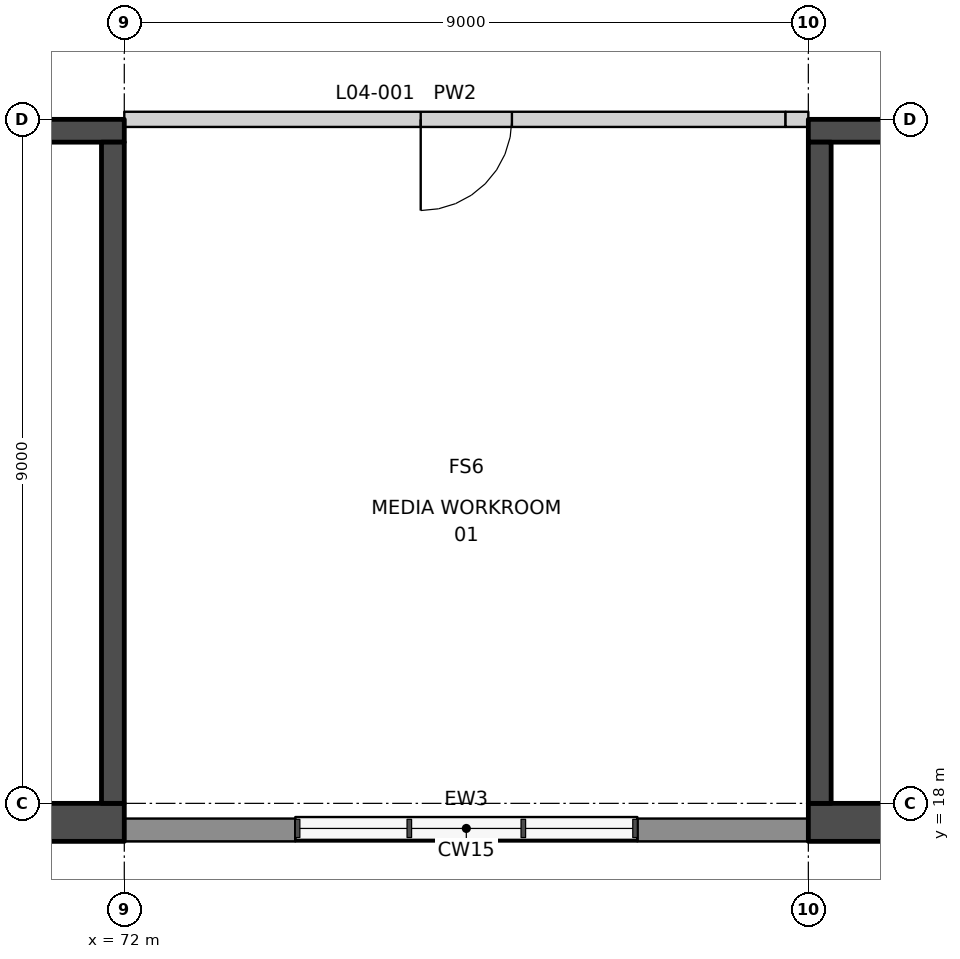
"""IFC4 building model, lengths in metres.
Left out: names, types, materials, properties, quantities, classifications, styles, units other than length and angle.
Written with IfcOpenShell. Run it as: python <this file> out.ifc"""

import sys

from ifc_helpers import new_model, si_unit, direction, frame, frame_2d, origin, place, context, subcontext, project, spatial, rectangle, extrude, element, fill, save


model = new_model("IFC4")
c1 = context("Model", 3, precision=1e-05, world=origin(), true_north=direction((0.0, 1.0)))
c2 = subcontext(c1, "Body", "Model", "MODEL_VIEW")
j1 = project(units=[si_unit("LENGTHUNIT", "METRE"), si_unit("PLANEANGLEUNIT", "RADIAN")], contexts=[c1])
p1 = place(None, origin())
s1 = spatial("IfcSite", under=j1, at=p1, CompositionType="ELEMENT")
p2 = place(p1, origin())
s2 = spatial("IfcBuilding", under=s1, at=p2, CompositionType="ELEMENT")
p3 = place(p2, frame((0.0, 0.0, 28.0)))
s3 = spatial("IfcBuildingStorey", under=s2, at=p3, CompositionType="ELEMENT", Elevation=28.0)
p4 = place(p3, frame((72.0, 27.0, 0.0), z_axis=(0.0, 0.0, 1.0), x_axis=(1.0, 0.0, 0.0)))
e1 = element("IfcWall", 1, at=p4, inside=s3, PredefinedType="PARTITIONING", context=c2, shape_type="SweptSolid", body=[
    extrude(rectangle(XDim=8.7, YDim=0.2, at=frame_2d((4.35, 0.0))), origin(), (0.0, 0.0, 1.0), 4.2),
])
p5 = place(p4, frame((3.9, 0.0, 0.0)))
e2 = element("IfcOpeningElement", 2, at=p5, cuts=e1, PredefinedType="OPENING", context=c2, shape_type="SweptSolid", body=[
    extrude(rectangle(XDim=1.2, YDim=2.1, at=frame_2d((0.6, 1.05))), frame((0.0, 0.11, 0.0), z_axis=(0.0, -1.0, 0.0), x_axis=(1.0, 0.0, 0.0)), (0.0, 0.0, 1.0), 0.22),
])
for number, where, z_axis, x_axis in (
    (3, (72.0, 17.65, 0.0), (0.0, 0.0, 1.0), (1.0, 0.0, 0.0)),
    (4, (78.75, 17.65, 0.0), (0.0, 0.0, 1.0), (1.0, 0.0, 0.0)),
):
    element("IfcWall", number, at=place(p3, frame(where, z_axis=z_axis, x_axis=x_axis)), inside=s3, PredefinedType="SOLIDWALL", context=c2, shape_type="SweptSolid", body=[
        extrude(rectangle(XDim=2.25, YDim=0.3, at=frame_2d((1.125, 0.0))), origin(), (0.0, 0.0, 1.0), 4.9),
    ])
p6 = place(p3, frame((74.25, 17.65, 0.0), z_axis=(0.0, 0.0, 1.0), x_axis=(1.0, 0.0, 0.0)))
e5 = element("IfcWall", 5, at=p6, inside=s3, PredefinedType="SOLIDWALL", context=c2, shape_type="SweptSolid", body=[
    extrude(rectangle(XDim=4.5, YDim=0.3, at=frame_2d((2.25, 0.0))), origin(), (0.0, 0.0, 1.0), 1.0),
])
p7 = place(p3, frame((81.0, 26.85, 0.0), z_axis=(0.0, 0.0, 1.0), x_axis=(1.0, 0.0, 0.0)))
e6 = element("IfcWall", 6, at=p7, inside=s3, PredefinedType="SHEAR", context=c2, shape_type="SweptSolid", body=[
    extrude(rectangle(XDim=18.0, YDim=0.3, at=frame_2d((9.0, 0.0))), origin(), (0.0, 0.0, 1.0), 5.5),
])
p8 = place(p7, frame((8.6, 0.0, 0.0)))
e7 = element("IfcOpeningElement", 7, at=p8, cuts=e6, PredefinedType="OPENING", context=c2, shape_type="SweptSolid", body=[
    extrude(rectangle(XDim=1.2, YDim=2.1, at=frame_2d((0.6, 1.05))), frame((0.0, 0.16, 0.0), z_axis=(0.0, -1.0, 0.0), x_axis=(1.0, 0.0, 0.0)), (0.0, 0.0, 1.0), 0.32),
])
p9 = place(p3, frame((81.0, 17.75, 0.0), z_axis=(0.0, 0.0, 1.0), x_axis=(1.0, 0.0, 0.0)))
e8 = element("IfcWall", 8, at=p9, inside=s3, PredefinedType="SHEAR", context=c2, shape_type="SweptSolid", body=[
    extrude(rectangle(XDim=18.0, YDim=0.5, at=frame_2d((9.0, 0.0))), origin(), (0.0, 0.0, 1.0), 5.5),
])
p10 = place(p3, frame((81.15, 26.7, 0.0), z_axis=(0.0, 0.0, 1.0), x_axis=(0.0, -1.0, 0.0)))
e9 = element("IfcWall", 9, at=p10, inside=s3, PredefinedType="SHEAR", context=c2, shape_type="SweptSolid", body=[
    extrude(rectangle(XDim=8.7, YDim=0.3, at=frame_2d((4.35, 0.0))), origin(), (0.0, 0.0, 1.0), 5.5),
])
p11 = place(p3, frame((72.0, 26.85, 0.0), z_axis=(0.0, 0.0, 1.0), x_axis=(-1.0, 0.0, 0.0)))
e10 = element("IfcWall", 10, at=p11, inside=s3, PredefinedType="SHEAR", context=c2, shape_type="SweptSolid", body=[
    extrude(rectangle(XDim=18.0, YDim=0.3, at=frame_2d((9.0, 0.0))), origin(), (0.0, 0.0, 1.0), 5.5),
])
p12 = place(p11, frame((8.6, 0.0, 0.0)))
e11 = element("IfcOpeningElement", 11, at=p12, cuts=e10, PredefinedType="OPENING", context=c2, shape_type="SweptSolid", body=[
    extrude(rectangle(XDim=1.2, YDim=2.1, at=frame_2d((0.6, 1.05))), frame((0.0, 0.16, 0.0), z_axis=(0.0, -1.0, 0.0), x_axis=(1.0, 0.0, 0.0)), (0.0, 0.0, 1.0), 0.32),
])
p13 = place(p3, frame((72.0, 17.75, 0.0), z_axis=(0.0, 0.0, 1.0), x_axis=(-1.0, 0.0, 0.0)))
e12 = element("IfcWall", 12, at=p13, inside=s3, PredefinedType="SHEAR", context=c2, shape_type="SweptSolid", body=[
    extrude(rectangle(XDim=18.0, YDim=0.5, at=frame_2d((9.0, 0.0))), origin(), (0.0, 0.0, 1.0), 5.5),
])
p14 = place(p3, frame((71.85, 26.7, 0.0), z_axis=(0.0, 0.0, 1.0), x_axis=(0.0, -1.0, 0.0)))
e13 = element("IfcWall", 13, at=p14, inside=s3, PredefinedType="SHEAR", context=c2, shape_type="SweptSolid", body=[
    extrude(rectangle(XDim=8.7, YDim=0.3, at=frame_2d((4.35, 0.0))), origin(), (0.0, 0.0, 1.0), 5.5),
])
p15 = place(p3, frame((80.7, 27.0, 0.0), z_axis=(0.0, 0.0, 1.0), x_axis=(1.0, 0.0, 0.0)))
e14 = element("IfcWall", 14, at=p15, inside=s3, PredefinedType="PARTITIONING", context=c2, shape_type="SweptSolid", body=[
    extrude(rectangle(XDim=0.3, YDim=0.2, at=frame_2d((0.15, 0.0))), origin(), (0.0, 0.0, 1.0), 5.5),
])
p16 = place(p5, frame((1.2, 0.0, 0.0), z_axis=(0.0, 0.0, 1.0), x_axis=(-1.0, 0.0, 0.0)))
e15 = element("IfcDoor", 15, at=p16, inside=s3, OperationType="SINGLE_SWING_RIGHT", PredefinedType="DOOR", context=c2, shape_type="SweptSolid", body=[
    extrude(rectangle(XDim=1.2, YDim=2.1, at=frame_2d((0.6, 1.05))), frame((0.0, 0.025, 0.0), z_axis=(0.0, -1.0, 0.0), x_axis=(1.0, 0.0, 0.0)), (0.0, 0.0, 1.0), 0.05),
])
fill(e2, e15)
save(model, sys.argv[1])
